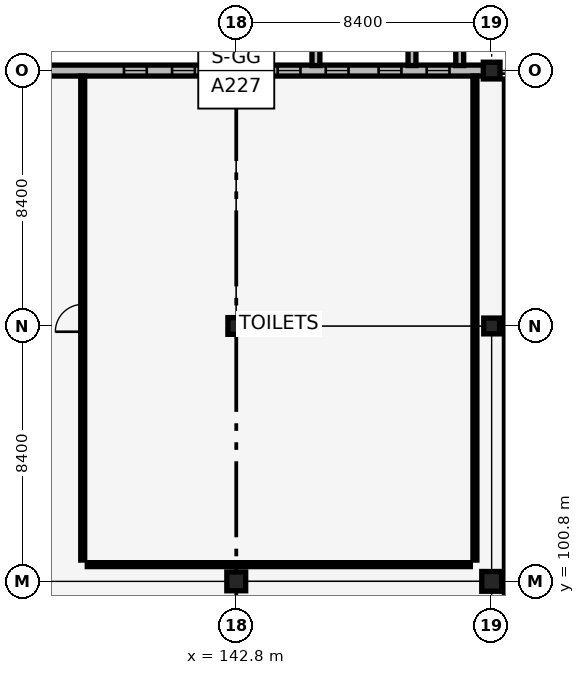
"""IFC4 building model, lengths in metres.
Left out: names, types, materials, properties, quantities, classifications, styles, units other than length and angle.
Written with IfcOpenShell. Run it as: python <this file> out.ifc"""

import sys

from ifc_helpers import new_model, si_unit, direction, frame, frame_2d, origin, origin_2d, place, context, subcontext, project, spatial, rectangle, extrude, element, fill, save


model = new_model("IFC4")
c1 = context("Model", 3, precision=1e-05, world=origin(), true_north=direction((0.0, 1.0)))
c2 = subcontext(c1, "Body", "Model", "MODEL_VIEW")
j1 = project(units=[si_unit("LENGTHUNIT", "METRE"), si_unit("PLANEANGLEUNIT", "RADIAN")], contexts=[c1])
p1 = place(None, origin())
s1 = spatial("IfcSite", under=j1, at=p1, CompositionType="ELEMENT")
p2 = place(p1, origin())
s2 = spatial("IfcBuilding", under=s1, at=p2, CompositionType="ELEMENT")
p3 = place(p2, frame((0.0, 0.0, 13.94)))
s3 = spatial("IfcBuildingStorey", under=s2, at=p3, CompositionType="ELEMENT", Elevation=13.94)
p4 = place(p3, frame((142.8, 100.8, 0.0), z_axis=(0.0, 0.0, 1.0), x_axis=(1.0, 0.0, 0.0)))
e1 = element("IfcColumn", 1, at=p4, inside=s3, PredefinedType="COLUMN", context=c2, shape_type="SweptSolid", body=[
    extrude(rectangle(XDim=0.62, YDim=0.62, at=origin_2d()), origin(), (0.0, 0.0, 1.0), 3.78),
])
p5 = place(p3, frame((142.8, 109.2, 0.0), z_axis=(0.0, 0.0, 1.0), x_axis=(1.0, 0.0, 0.0)))
e2 = element("IfcColumn", 2, at=p5, inside=s3, PredefinedType="COLUMN", context=c2, shape_type="SweptSolid", body=[
    extrude(rectangle(XDim=0.55, YDim=0.55, at=origin_2d()), origin(), (0.0, 0.0, 1.0), 3.78),
])
p6 = place(p3, frame((142.8, 117.6, 0.0), z_axis=(0.0, 0.0, 1.0), x_axis=(1.0, 0.0, 0.0)))
e3 = element("IfcColumn", 3, at=p6, inside=s3, PredefinedType="COLUMN", context=c2, shape_type="SweptSolid", body=[
    extrude(rectangle(XDim=0.5, YDim=0.5, at=origin_2d()), origin(), (0.0, 0.0, 1.0), 3.78),
])
p7 = place(p3, frame((151.2, 100.8, 0.0), z_axis=(0.0, 0.0, 1.0), x_axis=(1.0, 0.0, 0.0)))
e4 = element("IfcColumn", 4, at=p7, inside=s3, PredefinedType="COLUMN", context=c2, shape_type="SweptSolid", body=[
    extrude(rectangle(XDim=0.65, YDim=0.65, at=origin_2d()), origin(), (0.0, 0.0, 1.0), 3.78),
])
p8 = place(p3, frame((151.2, 109.2, 0.0), z_axis=(0.0, 0.0, 1.0), x_axis=(1.0, 0.0, 0.0)))
e5 = element("IfcColumn", 5, at=p8, inside=s3, PredefinedType="COLUMN", context=c2, shape_type="SweptSolid", body=[
    extrude(rectangle(XDim=0.52, YDim=0.52, at=origin_2d()), origin(), (0.0, 0.0, 1.0), 3.78),
])
p9 = place(p3, frame((151.2, 117.6, 0.0), z_axis=(0.0, 0.0, 1.0), x_axis=(1.0, 0.0, 0.0)))
e6 = element("IfcColumn", 6, at=p9, inside=s3, PredefinedType="COLUMN", context=c2, shape_type="SweptSolid", body=[
    extrude(rectangle(XDim=0.55, YDim=0.55, at=origin_2d()), origin(), (0.0, 0.0, 1.0), 3.78),
])
p10 = place(p3, frame((134.66, 117.6, 0.0), z_axis=(0.0, 0.0, 1.0), x_axis=(1.0, 0.0, 0.0)))
e7 = element("IfcWall", 7, at=p10, inside=s3, PredefinedType="SOLIDWALL", context=c2, shape_type="SweptSolid", body=[
    extrude(rectangle(XDim=7.905, YDim=0.36, at=frame_2d((3.953, 0.0))), origin(), (0.0, 0.0, 1.0), 3.15),
])
p11 = place(p10, frame((1.127, 0.0, 0.7)))
e8 = element("IfcOpeningElement", 8, at=p11, cuts=e7, PredefinedType="OPENING", context=c2, shape_type="SweptSolid", body=[
    extrude(rectangle(XDim=0.75, YDim=2.1, at=frame_2d((0.375, 1.05))), frame((0.0, 0.19, 0.0), z_axis=(0.0, -1.0, 0.0), x_axis=(1.0, 0.0, 0.0)), (0.0, 0.0, 1.0), 0.38),
])
p12 = place(p10, frame((4.447, 0.0, 0.7)))
e9 = element("IfcOpeningElement", 9, at=p12, cuts=e7, PredefinedType="OPENING", context=c2, shape_type="SweptSolid", body=[
    extrude(rectangle(XDim=0.75, YDim=2.1, at=frame_2d((0.375, 1.05))), frame((0.0, 0.19, 0.0), z_axis=(0.0, -1.0, 0.0), x_axis=(1.0, 0.0, 0.0)), (0.0, 0.0, 1.0), 0.38),
])
p13 = place(p10, frame((6.028, 0.0, 0.7)))
e10 = element("IfcOpeningElement", 10, at=p13, cuts=e7, PredefinedType="OPENING", context=c2, shape_type="SweptSolid", body=[
    extrude(rectangle(XDim=0.75, YDim=2.1, at=frame_2d((0.375, 1.05))), frame((0.0, 0.19, 0.0), z_axis=(0.0, -1.0, 0.0), x_axis=(1.0, 0.0, 0.0)), (0.0, 0.0, 1.0), 0.38),
])
p14 = place(p3, frame((143.035, 117.6, 0.0), z_axis=(0.0, 0.0, 1.0), x_axis=(1.0, 0.0, 0.0)))
e11 = element("IfcWall", 11, at=p14, inside=s3, PredefinedType="SOLIDWALL", context=c2, shape_type="SweptSolid", body=[
    extrude(rectangle(XDim=7.905, YDim=0.36, at=frame_2d((3.953, 0.0))), origin(), (0.0, 0.0, 1.0), 3.15),
])
p15 = place(p14, frame((1.127, 0.0, 0.7)))
e12 = element("IfcOpeningElement", 12, at=p15, cuts=e11, PredefinedType="OPENING", context=c2, shape_type="SweptSolid", body=[
    extrude(rectangle(XDim=0.75, YDim=2.1, at=frame_2d((0.375, 1.05))), frame((0.0, 0.19, 0.0), z_axis=(0.0, -1.0, 0.0), x_axis=(1.0, 0.0, 0.0)), (0.0, 0.0, 1.0), 0.38),
])
p16 = place(p14, frame((2.708, 0.0, 0.7)))
e13 = element("IfcOpeningElement", 13, at=p16, cuts=e11, PredefinedType="OPENING", context=c2, shape_type="SweptSolid", body=[
    extrude(rectangle(XDim=0.75, YDim=2.1, at=frame_2d((0.375, 1.05))), frame((0.0, 0.19, 0.0), z_axis=(0.0, -1.0, 0.0), x_axis=(1.0, 0.0, 0.0)), (0.0, 0.0, 1.0), 0.38),
])
p17 = place(p14, frame((4.447, 0.0, 0.7)))
e14 = element("IfcOpeningElement", 14, at=p17, cuts=e11, PredefinedType="OPENING", context=c2, shape_type="SweptSolid", body=[
    extrude(rectangle(XDim=0.75, YDim=2.1, at=frame_2d((0.375, 1.05))), frame((0.0, 0.19, 0.0), z_axis=(0.0, -1.0, 0.0), x_axis=(1.0, 0.0, 0.0)), (0.0, 0.0, 1.0), 0.38),
])
p18 = place(p14, frame((6.028, 0.0, 0.7)))
e15 = element("IfcOpeningElement", 15, at=p18, cuts=e11, PredefinedType="OPENING", context=c2, shape_type="SweptSolid", body=[
    extrude(rectangle(XDim=0.75, YDim=2.1, at=frame_2d((0.375, 1.05))), frame((0.0, 0.19, 0.0), z_axis=(0.0, -1.0, 0.0), x_axis=(1.0, 0.0, 0.0)), (0.0, 0.0, 1.0), 0.38),
])
for number, where, z_axis, x_axis in (
    (16, (143.85, 117.765, 0.0), (0.0, 0.0, 1.0), (0.0, 1.0, 0.0)),
    (17, (145.42, 117.765, 0.0), (0.0, 0.0, 1.0), (0.0, 1.0, 0.0)),
    (18, (148.58, 117.765, 0.0), (0.0, 0.0, 1.0), (0.0, 1.0, 0.0)),
    (19, (150.15, 117.765, 0.0), (0.0, 0.0, 1.0), (0.0, 1.0, 0.0)),
):
    element("IfcWall", number, at=place(p3, frame(where, z_axis=z_axis, x_axis=x_axis)), inside=s3, PredefinedType="SOLIDWALL", context=c2, shape_type="SweptSolid", body=[
        extrude(rectangle(XDim=0.7, YDim=0.26, at=frame_2d((0.35, 0.0))), origin(), (0.0, 0.0, 1.0), 4.08),
    ])
p19 = place(p3, frame((151.7, 87.5, 0.0), z_axis=(0.0, 0.0, 1.0), x_axis=(0.0, 1.0, 0.0)))
e20 = element("IfcWall", 20, at=p19, inside=s3, PredefinedType="PARTITIONING", context=c2, shape_type="SweptSolid", body=[
    extrude(rectangle(XDim=29.82, YDim=0.16, at=frame_2d((14.91, 0.0))), origin(), (0.0, 0.0, 1.0), 3.05),
])
p20 = place(p3, frame((137.75, 101.5, 0.0), z_axis=(0.0, 0.0, 1.0), x_axis=(0.0, 1.0, 0.0)))
e21 = element("IfcWall", 21, at=p20, inside=s3, PredefinedType="PARTITIONING", context=c2, shape_type="SweptSolid", body=[
    extrude(rectangle(XDim=15.92, YDim=0.13, at=frame_2d((7.96, 0.0))), origin(), (0.0, 0.0, 1.0), 3.13),
])
p21 = place(p20, frame((7.51, 0.0, 0.0)))
e22 = element("IfcOpeningElement", 22, at=p21, cuts=e21, PredefinedType="OPENING", context=c2, shape_type="SweptSolid", body=[
    extrude(rectangle(XDim=0.9, YDim=2.1, at=frame_2d((0.45, 1.05))), frame((0.0, 0.075, 0.0), z_axis=(0.0, -1.0, 0.0), x_axis=(1.0, 0.0, 0.0)), (0.0, 0.0, 1.0), 0.15),
])
p22 = place(p3, frame((137.9, 101.35, 0.0), z_axis=(0.0, 0.0, 1.0), x_axis=(1.0, 0.0, 0.0)))
e23 = element("IfcWall", 23, at=p22, inside=s3, PredefinedType="PARTITIONING", context=c2, shape_type="SweptSolid", body=[
    extrude(rectangle(XDim=12.6, YDim=0.13, at=frame_2d((6.3, 0.0))), origin(), (0.0, 0.0, 1.0), 3.35),
])
p23 = place(p3, frame((150.65, 101.5, 0.0), z_axis=(0.0, 0.0, 1.0), x_axis=(0.0, 1.0, 0.0)))
e24 = element("IfcWall", 24, at=p23, inside=s3, PredefinedType="PARTITIONING", context=c2, shape_type="SweptSolid", body=[
    extrude(rectangle(XDim=15.92, YDim=0.13, at=frame_2d((7.96, 0.0))), origin(), (0.0, 0.0, 1.0), 3.13),
])
p24 = place(p12, origin())
e25 = element("IfcWindow", 25, at=p24, inside=s3, PartitioningType="DOUBLE_PANEL_VERTICAL", PredefinedType="WINDOW", context=c2, shape_type="SweptSolid", body=[
    extrude(rectangle(XDim=0.75, YDim=2.1, at=frame_2d((0.375, 1.05))), frame((0.0, 0.03, 0.0), z_axis=(0.0, -1.0, 0.0), x_axis=(1.0, 0.0, 0.0)), (0.0, 0.0, 1.0), 0.06),
])
fill(e9, e25)
p25 = place(p13, origin())
e26 = element("IfcWindow", 26, at=p25, inside=s3, PartitioningType="DOUBLE_PANEL_VERTICAL", PredefinedType="WINDOW", context=c2, shape_type="SweptSolid", body=[
    extrude(rectangle(XDim=0.75, YDim=2.1, at=frame_2d((0.375, 1.05))), frame((0.0, 0.03, 0.0), z_axis=(0.0, -1.0, 0.0), x_axis=(1.0, 0.0, 0.0)), (0.0, 0.0, 1.0), 0.06),
])
fill(e10, e26)
p26 = place(p15, origin())
e27 = element("IfcWindow", 27, at=p26, inside=s3, PartitioningType="DOUBLE_PANEL_VERTICAL", PredefinedType="WINDOW", context=c2, shape_type="SweptSolid", body=[
    extrude(rectangle(XDim=0.75, YDim=2.1, at=frame_2d((0.375, 1.05))), frame((0.0, 0.03, 0.0), z_axis=(0.0, -1.0, 0.0), x_axis=(1.0, 0.0, 0.0)), (0.0, 0.0, 1.0), 0.06),
])
fill(e12, e27)
p27 = place(p16, origin())
e28 = element("IfcWindow", 28, at=p27, inside=s3, PartitioningType="DOUBLE_PANEL_VERTICAL", PredefinedType="WINDOW", context=c2, shape_type="SweptSolid", body=[
    extrude(rectangle(XDim=0.75, YDim=2.1, at=frame_2d((0.375, 1.05))), frame((0.0, 0.03, 0.0), z_axis=(0.0, -1.0, 0.0), x_axis=(1.0, 0.0, 0.0)), (0.0, 0.0, 1.0), 0.06),
])
fill(e13, e28)
p28 = place(p17, origin())
e29 = element("IfcWindow", 29, at=p28, inside=s3, PartitioningType="DOUBLE_PANEL_VERTICAL", PredefinedType="WINDOW", context=c2, shape_type="SweptSolid", body=[
    extrude(rectangle(XDim=0.75, YDim=2.1, at=frame_2d((0.375, 1.05))), frame((0.0, 0.03, 0.0), z_axis=(0.0, -1.0, 0.0), x_axis=(1.0, 0.0, 0.0)), (0.0, 0.0, 1.0), 0.06),
])
fill(e14, e29)
p29 = place(p18, origin())
e30 = element("IfcWindow", 30, at=p29, inside=s3, PartitioningType="DOUBLE_PANEL_VERTICAL", PredefinedType="WINDOW", context=c2, shape_type="SweptSolid", body=[
    extrude(rectangle(XDim=0.75, YDim=2.1, at=frame_2d((0.375, 1.05))), frame((0.0, 0.03, 0.0), z_axis=(0.0, -1.0, 0.0), x_axis=(1.0, 0.0, 0.0)), (0.0, 0.0, 1.0), 0.06),
])
fill(e15, e30)
p30 = place(p21, origin())
e31 = element("IfcDoor", 31, at=p30, inside=s3, OperationType="SINGLE_SWING_LEFT", PredefinedType="DOOR", context=c2, shape_type="SweptSolid", body=[
    extrude(rectangle(XDim=0.9, YDim=2.1, at=frame_2d((0.45, 1.05))), frame((0.0, 0.025, 0.0), z_axis=(0.0, -1.0, 0.0), x_axis=(1.0, 0.0, 0.0)), (0.0, 0.0, 1.0), 0.05),
])
fill(e22, e31)
save(model, sys.argv[1])
